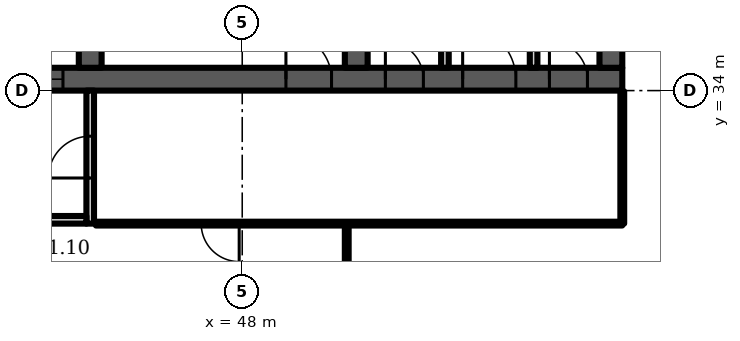
"""IFC4 building model, lengths in metres.
Left out: names, types, materials, properties, quantities, classifications, styles, units other than length and angle.
Written with IfcOpenShell. Run it as: python <this file> out.ifc"""

import sys

from ifc_helpers import new_model, si_unit, direction, frame, frame_2d, origin, place, context, subcontext, project, spatial, polyline, rectangle, outline, extrude, element, fill, save


model = new_model("IFC4")
c1 = context("Model", 3, precision=1e-05, world=origin(), true_north=direction((0.0, 1.0)))
c2 = subcontext(c1, "Body", "Model", "MODEL_VIEW")
j1 = project(units=[si_unit("LENGTHUNIT", "METRE"), si_unit("PLANEANGLEUNIT", "RADIAN")], contexts=[c1])
p1 = place(None, origin())
s1 = spatial("IfcSite", under=j1, at=p1, CompositionType="ELEMENT")
p2 = place(p1, origin())
s2 = spatial("IfcBuilding", under=s1, at=p2, CompositionType="ELEMENT")
p3 = place(p2, frame((0.0, 0.0, 207.1)))
s3 = spatial("IfcBuildingStorey", under=s2, at=p3, CompositionType="ELEMENT", Elevation=207.1)
p4 = place(p3, frame((23.0, 34.3, 0.0), z_axis=(0.0, 0.0, 1.0), x_axis=(1.0, 0.0, 0.0)))
e1 = element("IfcWall", 1, at=p4, inside=s3, PredefinedType="SHEAR", context=c2, shape_type="SweptSolid", body=[
    extrude(rectangle(XDim=35.0, YDim=0.6, at=frame_2d((17.5, 0.0))), origin(), (0.0, 0.0, 1.0), 3.6),
])
p5 = place(p4, frame((0.65, 0.0, 0.0)))
e2 = element("IfcOpeningElement", 2, at=p5, cuts=e1, PredefinedType="OPENING", context=c2, shape_type="SweptSolid", body=[
    extrude(rectangle(XDim=1.2, YDim=2.1, at=frame_2d((0.6, 1.05))), frame((0.0, 0.31, 0.0), z_axis=(0.0, -1.0, 0.0), x_axis=(1.0, 0.0, 0.0)), (0.0, 0.0, 1.0), 0.62),
])
p6 = place(p4, frame((7.717, 0.0, 0.0)))
e3 = element("IfcOpeningElement", 3, at=p6, cuts=e1, PredefinedType="OPENING", context=c2, shape_type="SweptSolid", body=[
    extrude(rectangle(XDim=1.1, YDim=2.1, at=frame_2d((0.55, 1.05))), frame((0.0, 0.31, 0.0), z_axis=(0.0, -1.0, 0.0), x_axis=(1.0, 0.0, 0.0)), (0.0, 0.0, 1.0), 0.62),
])
p7 = place(p4, frame((12.183, 0.0, 0.0)))
e4 = element("IfcOpeningElement", 4, at=p7, cuts=e1, PredefinedType="OPENING", context=c2, shape_type="SweptSolid", body=[
    extrude(rectangle(XDim=1.1, YDim=2.1, at=frame_2d((0.55, 1.05))), frame((0.0, 0.31, 0.0), z_axis=(0.0, -1.0, 0.0), x_axis=(1.0, 0.0, 0.0)), (0.0, 0.0, 1.0), 0.62),
])
p8 = place(p4, frame((9.8, 0.0, 0.0)))
e5 = element("IfcOpeningElement", 5, at=p8, cuts=e1, PredefinedType="OPENING", context=c2, shape_type="SweptSolid", body=[
    extrude(rectangle(XDim=1.4, YDim=2.1, at=frame_2d((0.7, 1.05))), frame((0.0, 0.31, 0.0), z_axis=(0.0, -1.0, 0.0), x_axis=(1.0, 0.0, 0.0)), (0.0, 0.0, 1.0), 0.62),
])
p9 = place(p4, frame((14.717, 0.0, 0.0)))
e6 = element("IfcOpeningElement", 6, at=p9, cuts=e1, PredefinedType="OPENING", context=c2, shape_type="SweptSolid", body=[
    extrude(rectangle(XDim=1.1, YDim=2.1, at=frame_2d((0.55, 1.05))), frame((0.0, 0.31, 0.0), z_axis=(0.0, -1.0, 0.0), x_axis=(1.0, 0.0, 0.0)), (0.0, 0.0, 1.0), 0.62),
])
p10 = place(p4, frame((16.95, 0.0, 0.0)))
e7 = element("IfcOpeningElement", 7, at=p10, cuts=e1, PredefinedType="OPENING", context=c2, shape_type="SweptSolid", body=[
    extrude(rectangle(XDim=1.1, YDim=2.1, at=frame_2d((0.55, 1.05))), frame((0.0, 0.31, 0.0), z_axis=(0.0, -1.0, 0.0), x_axis=(1.0, 0.0, 0.0)), (0.0, 0.0, 1.0), 0.62),
])
p11 = place(p4, frame((19.183, 0.0, 0.0)))
e8 = element("IfcOpeningElement", 8, at=p11, cuts=e1, PredefinedType="OPENING", context=c2, shape_type="SweptSolid", body=[
    extrude(rectangle(XDim=1.1, YDim=2.1, at=frame_2d((0.55, 1.05))), frame((0.0, 0.31, 0.0), z_axis=(0.0, -1.0, 0.0), x_axis=(1.0, 0.0, 0.0)), (0.0, 0.0, 1.0), 0.62),
])
p12 = place(p4, frame((26.15, 0.0, 0.0)))
e9 = element("IfcOpeningElement", 9, at=p12, cuts=e1, PredefinedType="OPENING", context=c2, shape_type="SweptSolid", body=[
    extrude(rectangle(XDim=1.2, YDim=2.1, at=frame_2d((0.6, 1.05))), frame((0.0, 0.31, 0.0), z_axis=(0.0, -1.0, 0.0), x_axis=(1.0, 0.0, 0.0)), (0.0, 0.0, 1.0), 0.62),
])
p13 = place(p4, frame((28.767, 0.0, 0.0)))
e10 = element("IfcOpeningElement", 10, at=p13, cuts=e1, PredefinedType="OPENING", context=c2, shape_type="SweptSolid", body=[
    extrude(rectangle(XDim=1.0, YDim=2.1, at=frame_2d((0.5, 1.05))), frame((0.0, 0.31, 0.0), z_axis=(0.0, -1.0, 0.0), x_axis=(1.0, 0.0, 0.0)), (0.0, 0.0, 1.0), 0.62),
])
p14 = place(p4, frame((33.083, 0.0, 0.0)))
e11 = element("IfcOpeningElement", 11, at=p14, cuts=e1, PredefinedType="OPENING", context=c2, shape_type="SweptSolid", body=[
    extrude(rectangle(XDim=1.0, YDim=2.1, at=frame_2d((0.5, 1.05))), frame((0.0, 0.31, 0.0), z_axis=(0.0, -1.0, 0.0), x_axis=(1.0, 0.0, 0.0)), (0.0, 0.0, 1.0), 0.62),
])
p15 = place(p4, frame((30.8, 0.0, 0.0)))
e12 = element("IfcOpeningElement", 12, at=p15, cuts=e1, PredefinedType="OPENING", context=c2, shape_type="SweptSolid", body=[
    extrude(rectangle(XDim=1.4, YDim=2.1, at=frame_2d((0.7, 1.05))), frame((0.0, 0.31, 0.0), z_axis=(0.0, -1.0, 0.0), x_axis=(1.0, 0.0, 0.0)), (0.0, 0.0, 1.0), 0.62),
])
p16 = place(p3, frame((44.0, 34.6, 0.0), z_axis=(0.0, 0.0, 1.0), x_axis=(0.0, 1.0, 0.0)))
e13 = element("IfcWall", 13, at=p16, inside=s3, PredefinedType="SHEAR", context=c2, shape_type="SweptSolid", body=[
    extrude(rectangle(XDim=14.784, YDim=0.6, at=frame_2d((7.392, 0.0))), origin(), (0.0, 0.0, 1.0), 3.6),
])
p17 = place(p16, frame((11.608, 0.0, 0.0)))
e14 = element("IfcOpeningElement", 14, at=p17, cuts=e13, PredefinedType="OPENING", context=c2, shape_type="SweptSolid", body=[
    extrude(rectangle(XDim=1.0, YDim=2.1, at=frame_2d((0.5, 1.05))), frame((0.0, 0.31, 0.0), z_axis=(0.0, -1.0, 0.0), x_axis=(1.0, 0.0, 0.0)), (0.0, 0.0, 1.0), 0.62),
])
p18 = place(p16, frame((3.8, 0.0, 0.0)))
e15 = element("IfcOpeningElement", 15, at=p18, cuts=e13, PredefinedType="OPENING", context=c2, shape_type="SweptSolid", body=[
    extrude(rectangle(XDim=1.1, YDim=2.1, at=frame_2d((0.55, 1.05))), frame((0.0, 0.31, 0.0), z_axis=(0.0, -1.0, 0.0), x_axis=(1.0, 0.0, 0.0)), (0.0, 0.0, 1.0), 0.62),
])
p19 = place(p3, frame((51.0, 34.6, 0.0), z_axis=(0.0, 0.0, 1.0), x_axis=(0.0, 1.0, 0.0)))
e16 = element("IfcWall", 16, at=p19, inside=s3, PredefinedType="SHEAR", context=c2, shape_type="SweptSolid", body=[
    extrude(rectangle(XDim=14.171, YDim=0.6, at=frame_2d((7.085, 0.0))), origin(), (0.0, 0.0, 1.0), 3.6),
])
p20 = place(p19, frame((3.8, 0.0, 0.0)))
e17 = element("IfcOpeningElement", 17, at=p20, cuts=e16, PredefinedType="OPENING", context=c2, shape_type="SweptSolid", body=[
    extrude(rectangle(XDim=1.1, YDim=2.1, at=frame_2d((0.55, 1.05))), frame((0.0, 0.31, 0.0), z_axis=(0.0, -1.0, 0.0), x_axis=(1.0, 0.0, 0.0)), (0.0, 0.0, 1.0), 0.62),
])
p21 = place(p3, frame((57.7, 34.6, 0.0), z_axis=(0.0, 0.0, 1.0), x_axis=(0.0, 1.0, 0.0)))
e18 = element("IfcWall", 18, at=p21, inside=s3, PredefinedType="SHEAR", context=c2, shape_type="SweptSolid", body=[
    extrude(rectangle(XDim=13.585, YDim=0.6, at=frame_2d((6.792, 0.0))), origin(), (0.0, 0.0, 1.0), 3.6),
])
p22 = place(p3, frame((0.0, 0.0, -0.0)))
e19 = element("IfcWall", 19, at=p22, inside=s3, PredefinedType="PARTITIONING", context=c2, shape_type="SweptSolid", body=[
    extrude(outline(polyline([(41.567, 37.1), (39.433, 37.1), (39.433, 34.6), (39.233, 34.6), (39.233, 37.45), (37.3, 37.45), (37.3, 37.65), (39.233, 37.65), (39.433, 37.65), (39.433, 37.3), (41.567, 37.3), (41.567, 37.35), (41.767, 37.35), (43.7, 37.35), (43.7, 37.15), (41.767, 37.15), (41.767, 34.6), (41.567, 34.6), (41.567, 37.1)])), origin(), (0.0, 0.0, 1.0), 3.2),
])
p23 = place(p3, frame((0.0, 0.0, -0.0)))
e20 = element("IfcWall", 20, at=p23, inside=s3, PredefinedType="PARTITIONING", context=c2, shape_type="SweptSolid", body=[
    extrude(outline(polyline([(53.233, 34.6), (53.233, 37.3), (53.433, 37.3), (53.433, 34.6), (53.233, 34.6)])), origin(), (0.0, 0.0, 1.0), 3.2),
])
p24 = place(p3, frame((0.0, 0.0, -0.0)))
e21 = element("IfcWall", 21, at=p24, inside=s3, PredefinedType="PARTITIONING", context=c2, shape_type="SweptSolid", body=[
    extrude(outline(polyline([(55.567, 34.6), (55.567, 37.3), (55.767, 37.3), (55.767, 34.6), (55.567, 34.6)])), origin(), (0.0, 0.0, 1.0), 3.2),
])
p25 = place(p3, frame((44.0, 30.5, 0.0), z_axis=(0.0, 0.0, 1.0), x_axis=(0.0, 1.0, 0.0)))
e22 = element("IfcWall", 22, at=p25, inside=s3, PredefinedType="PARTITIONING", context=c2, shape_type="SweptSolid", body=[
    extrude(rectangle(XDim=3.5, YDim=0.2, at=frame_2d((1.75, 0.0))), origin(), (0.0, 0.0, 1.0), 3.2),
])
p26 = place(p25, frame((1.2, 0.0, 0.0)))
e23 = element("IfcOpeningElement", 23, at=p26, cuts=e22, PredefinedType="OPENING", context=c2, shape_type="SweptSolid", body=[
    extrude(rectangle(XDim=1.1, YDim=2.1, at=frame_2d((0.55, 1.05))), frame((0.0, 0.11, 0.0), z_axis=(0.0, -1.0, 0.0), x_axis=(1.0, 0.0, 0.0)), (0.0, 0.0, 1.0), 0.22),
])
p27 = place(p3, frame((41.1, 30.6, 0.0), z_axis=(0.0, 0.0, 1.0), x_axis=(1.0, 0.0, 0.0)))
e24 = element("IfcWall", 24, at=p27, inside=s3, PredefinedType="PARTITIONING", context=c2, shape_type="SweptSolid", body=[
    extrude(rectangle(XDim=2.8, YDim=0.2, at=frame_2d((1.4, 0.0))), origin(), (0.0, 0.0, 1.0), 3.2),
])
p28 = place(p3, frame((50.75, 19.2, 0.0), z_axis=(0.0, 0.0, 1.0), x_axis=(0.0, 1.0, 0.0)))
e25 = element("IfcWall", 25, at=p28, inside=s3, PredefinedType="PARTITIONING", context=c2, shape_type="SweptSolid", body=[
    extrude(rectangle(XDim=11.3, YDim=0.1, at=frame_2d((5.65, 0.0))), origin(), (0.0, 0.0, 1.0), 3.2),
])
p29 = place(p3, frame((58.0, 30.5, 0.0), z_axis=(0.0, 0.0, 1.0), x_axis=(0.0, 1.0, 0.0)))
e26 = element("IfcWall", 26, at=p29, inside=s3, PredefinedType="PARTITIONING", context=c2, shape_type="SweptSolid", body=[
    extrude(rectangle(XDim=3.48, YDim=0.1, at=frame_2d((1.74, 0.0))), origin(), (0.0, 0.0, 1.0), 3.2),
])
p30 = place(p3, frame((44.15, 30.5, 0.0), z_axis=(0.0, 0.0, 1.0), x_axis=(1.0, 0.0, 0.0)))
e27 = element("IfcWall", 27, at=p30, inside=s3, PredefinedType="PARTITIONING", context=c2, shape_type="SweptSolid", body=[
    extrude(rectangle(XDim=13.85, YDim=0.1, at=frame_2d((6.925, 0.0))), origin(), (0.0, 0.0, 1.0), 3.2),
])
p31 = place(p30, frame((2.77, 0.0, 0.0)))
e28 = element("IfcOpeningElement", 28, at=p31, cuts=e27, PredefinedType="OPENING", context=c2, shape_type="SweptSolid", body=[
    extrude(rectangle(XDim=1.0, YDim=2.1, at=frame_2d((0.5, 1.05))), frame((0.0, 0.06, 0.0), z_axis=(0.0, -1.0, 0.0), x_axis=(1.0, 0.0, 0.0)), (0.0, 0.0, 1.0), 0.12),
])
p32 = place(p11, origin())
e29 = element("IfcDoor", 29, at=p32, inside=s3, OperationType="DOUBLE_DOOR_SLIDING", PredefinedType="DOOR", context=c2, shape_type="SweptSolid", body=[
    extrude(rectangle(XDim=1.1, YDim=2.1, at=frame_2d((0.55, 1.05))), frame((0.0, 0.025, 0.0), z_axis=(0.0, -1.0, 0.0), x_axis=(1.0, 0.0, 0.0)), (0.0, 0.0, 1.0), 0.05),
])
fill(e8, e29)
p33 = place(p12, origin())
e30 = element("IfcDoor", 30, at=p33, inside=s3, OperationType="SINGLE_SWING_LEFT", PredefinedType="DOOR", context=c2, shape_type="SweptSolid", body=[
    extrude(rectangle(XDim=1.2, YDim=2.1, at=frame_2d((0.6, 1.05))), frame((0.0, 0.025, 0.0), z_axis=(0.0, -1.0, 0.0), x_axis=(1.0, 0.0, 0.0)), (0.0, 0.0, 1.0), 0.05),
])
fill(e9, e30)
p34 = place(p13, origin())
e31 = element("IfcDoor", 31, at=p34, inside=s3, OperationType="SINGLE_SWING_LEFT", PredefinedType="DOOR", context=c2, shape_type="SweptSolid", body=[
    extrude(rectangle(XDim=1.0, YDim=2.1, at=frame_2d((0.5, 1.05))), frame((0.0, 0.025, 0.0), z_axis=(0.0, -1.0, 0.0), x_axis=(1.0, 0.0, 0.0)), (0.0, 0.0, 1.0), 0.05),
])
fill(e10, e31)
p35 = place(p14, origin())
e32 = element("IfcDoor", 32, at=p35, inside=s3, OperationType="SINGLE_SWING_LEFT", PredefinedType="DOOR", context=c2, shape_type="SweptSolid", body=[
    extrude(rectangle(XDim=1.0, YDim=2.1, at=frame_2d((0.5, 1.05))), frame((0.0, 0.025, 0.0), z_axis=(0.0, -1.0, 0.0), x_axis=(1.0, 0.0, 0.0)), (0.0, 0.0, 1.0), 0.05),
])
fill(e11, e32)
p36 = place(p15, origin())
e33 = element("IfcDoor", 33, at=p36, inside=s3, OperationType="DOUBLE_DOOR_SINGLE_SWING", PredefinedType="DOOR", context=c2, shape_type="SweptSolid", body=[
    extrude(rectangle(XDim=1.4, YDim=2.1, at=frame_2d((0.7, 1.05))), frame((0.0, 0.025, 0.0), z_axis=(0.0, -1.0, 0.0), x_axis=(1.0, 0.0, 0.0)), (0.0, 0.0, 1.0), 0.05),
])
fill(e12, e33)
p37 = place(p26, origin())
e34 = element("IfcDoor", 34, at=p37, inside=s3, OperationType="SINGLE_SWING_LEFT", PredefinedType="DOOR", context=c2, shape_type="SweptSolid", body=[
    extrude(rectangle(XDim=1.1, YDim=2.1, at=frame_2d((0.55, 1.05))), frame((0.0, 0.025, 0.0), z_axis=(0.0, -1.0, 0.0), x_axis=(1.0, 0.0, 0.0)), (0.0, 0.0, 1.0), 0.05),
])
fill(e23, e34)
p38 = place(p31, origin())
e35 = element("IfcDoor", 35, at=p38, inside=s3, OperationType="SINGLE_SWING_RIGHT", PredefinedType="DOOR", context=c2, shape_type="SweptSolid", body=[
    extrude(rectangle(XDim=1.0, YDim=2.1, at=frame_2d((0.5, 1.05))), frame((0.0, 0.025, 0.0), z_axis=(0.0, -1.0, 0.0), x_axis=(1.0, 0.0, 0.0)), (0.0, 0.0, 1.0), 0.05),
])
fill(e28, e35)
save(model, sys.argv[1])
